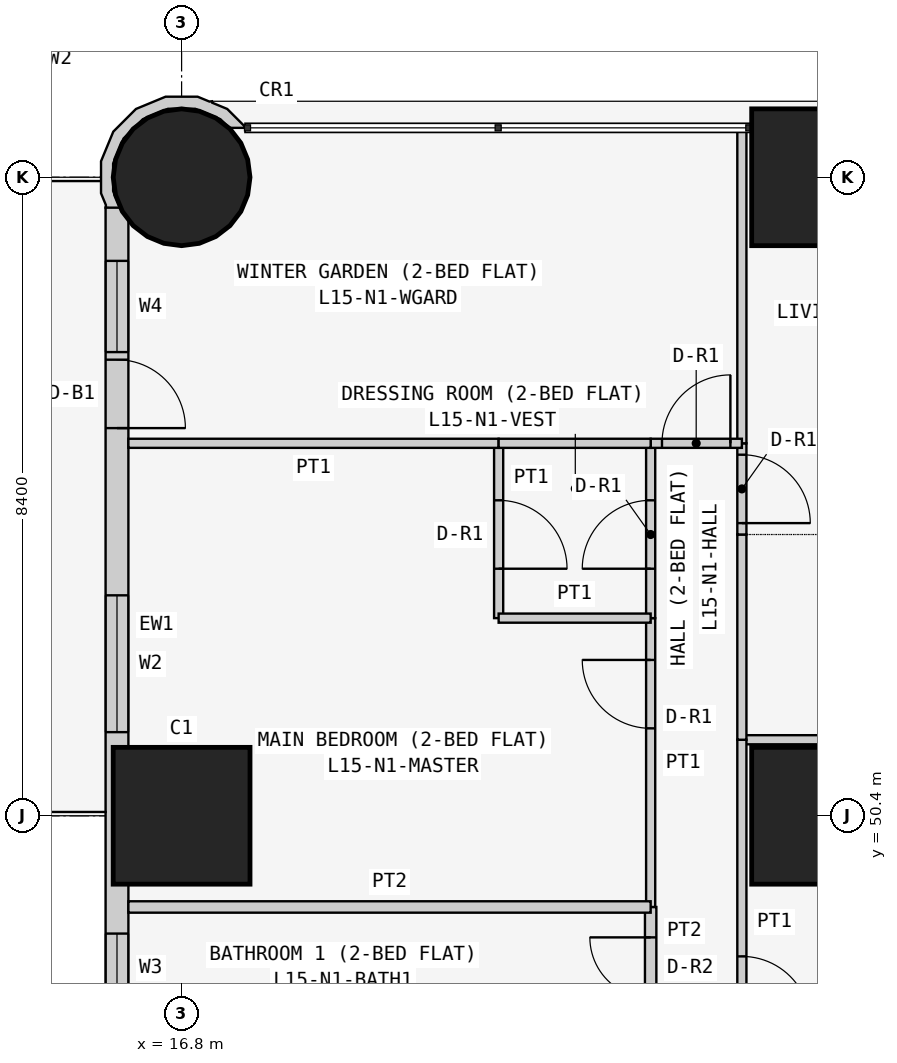
"""IFC4 building model, lengths in metres.
Left out: names, types, materials, properties, quantities, classifications, styles, units other than length and angle.
Written with IfcOpenShell. Run it as: python <this file> out.ifc"""

import sys

from ifc_helpers import new_model, si_unit, direction, frame, frame_2d, origin, origin_2d, place, context, subcontext, project, spatial, polyline, rectangle, circle, outline, extrude, element, fill, save


model = new_model("IFC4")
c1 = context("Model", 3, precision=1e-05, world=origin(), true_north=direction((0.0, 1.0)))
c2 = subcontext(c1, "Body", "Model", "MODEL_VIEW")
j1 = project(units=[si_unit("LENGTHUNIT", "METRE"), si_unit("PLANEANGLEUNIT", "RADIAN")], contexts=[c1])
p1 = place(None, origin())
s1 = spatial("IfcSite", under=j1, at=p1, CompositionType="ELEMENT")
p2 = place(p1, origin())
s2 = spatial("IfcBuilding", under=s1, at=p2, CompositionType="ELEMENT")
p3 = place(p2, frame((0.0, 0.0, 63.3)))
s3 = spatial("IfcBuildingStorey", under=s2, at=p3, CompositionType="ELEMENT", Elevation=63.3)
p4 = place(p3, frame((16.8, 50.4, 0.0), z_axis=(0.0, 0.0, 1.0), x_axis=(1.0, 0.0, 0.0)))
e1 = element("IfcColumn", 1, at=p4, inside=s3, PredefinedType="COLUMN", context=c2, shape_type="SweptSolid", body=[
    extrude(rectangle(XDim=1.8, YDim=1.8, at=origin_2d()), origin(), (0.0, 0.0, 1.0), 3.6),
])
p5 = place(p3, frame((16.8, 58.8, 0.0), z_axis=(0.0, 0.0, 1.0), x_axis=(1.0, 0.0, 0.0)))
e2 = element("IfcColumn", 2, at=p5, inside=s3, PredefinedType="COLUMN", context=c2, shape_type="SweptSolid", body=[
    extrude(circle(Radius=0.9, at=origin_2d()), origin(), (0.0, 0.0, 1.0), 3.6),
])
for number, where, z_axis, x_axis in (
    (3, (25.2, 50.4, 0.0), (0.0, 0.0, 1.0), (1.0, 0.0, 0.0)),
    (4, (25.2, 58.8, 0.0), (0.0, 0.0, 1.0), (1.0, 0.0, 0.0)),
):
    element("IfcColumn", number, at=place(p3, frame(where, z_axis=z_axis, x_axis=x_axis)), inside=s3, PredefinedType="COLUMN", context=c2, shape_type="SweptSolid", body=[
        extrude(rectangle(XDim=1.8, YDim=1.8, at=origin_2d()), origin(), (0.0, 0.0, 1.0), 3.6),
    ])
p6 = place(p3, frame((15.95, 58.4, 0.0), z_axis=(0.0, 0.0, 1.0), x_axis=(0.0, -1.0, 0.0)))
e5 = element("IfcWall", 5, at=p6, inside=s3, PredefinedType="SOLIDWALL", context=c2, shape_type="SweptSolid", body=[
    extrude(rectangle(XDim=15.7, YDim=0.3, at=frame_2d((7.85, 0.0))), origin(), (0.0, 0.0, 1.0), 3.45),
])
p7 = place(p6, frame((12.4, 0.0, 0.9)))
e6 = element("IfcOpeningElement", 6, at=p7, cuts=e5, PredefinedType="OPENING", context=c2, shape_type="SweptSolid", body=[
    extrude(rectangle(XDim=1.8, YDim=1.5, at=frame_2d((0.9, 0.75))), frame((0.0, 0.16, 0.0), z_axis=(0.0, -1.0, 0.0), x_axis=(1.0, 0.0, 0.0)), (0.0, 0.0, 1.0), 0.32),
])
p8 = place(p6, frame((9.55, 0.0, 1.5)))
e7 = element("IfcOpeningElement", 7, at=p8, cuts=e5, PredefinedType="OPENING", context=c2, shape_type="SweptSolid", body=[
    extrude(rectangle(XDim=0.9, YDim=0.7, at=frame_2d((0.45, 0.35))), frame((0.0, 0.16, 0.0), z_axis=(0.0, -1.0, 0.0), x_axis=(1.0, 0.0, 0.0)), (0.0, 0.0, 1.0), 0.32),
])
p9 = place(p6, frame((5.1, 0.0, 0.9)))
e8 = element("IfcOpeningElement", 8, at=p9, cuts=e5, PredefinedType="OPENING", context=c2, shape_type="SweptSolid", body=[
    extrude(rectangle(XDim=1.8, YDim=1.5, at=frame_2d((0.9, 0.75))), frame((0.0, 0.16, 0.0), z_axis=(0.0, -1.0, 0.0), x_axis=(1.0, 0.0, 0.0)), (0.0, 0.0, 1.0), 0.32),
])
p10 = place(p6, frame((2.0, 0.0, 0.0)))
e9 = element("IfcOpeningElement", 9, at=p10, cuts=e5, PredefinedType="OPENING", context=c2, shape_type="SweptSolid", body=[
    extrude(rectangle(XDim=0.9, YDim=2.4, at=frame_2d((0.45, 1.2))), frame((0.0, 0.16, 0.0), z_axis=(0.0, -1.0, 0.0), x_axis=(1.0, 0.0, 0.0)), (0.0, 0.0, 1.0), 0.32),
])
p11 = place(p6, frame((0.7, 0.0, 0.9)))
e10 = element("IfcOpeningElement", 10, at=p11, cuts=e5, PredefinedType="OPENING", context=c2, shape_type="SweptSolid", body=[
    extrude(rectangle(XDim=1.2, YDim=1.5, at=frame_2d((0.6, 0.75))), frame((0.0, 0.16, 0.0), z_axis=(0.0, -1.0, 0.0), x_axis=(1.0, 0.0, 0.0)), (0.0, 0.0, 1.0), 0.32),
])
p12 = place(p3, frame((17.567, 59.411, 0.0), z_axis=(0.0, 0.0, 1.0), x_axis=(-0.377204953059, 0.926129809145, 0.0)))
e11 = element("IfcWall", 11, at=p12, inside=s3, PredefinedType="SOLIDWALL", context=c2, shape_type="SweptSolid", body=[
    extrude(outline(polyline([(-0.27, 2.017), (-0.37, 1.841), (-0.102, 1.842), (0.23, 1.707), (0.484, 1.455), (0.624, 1.125), (0.626, 0.766), (0.491, 0.434), (0.239, 0.18), (0.09, 0.117), (0.011, -0.078), (0.024, -0.083), (0.329, 0.045), (0.48, 0.198), (0.499, 0.193), (0.508, 0.225), (0.626, 0.345), (0.785, 0.736), (0.782, 1.157), (0.619, 1.546), (0.319, 1.842), (-0.072, 2.002), (-0.24, 2.0), (-0.27, 2.017)])), origin(), (0.0, 0.0, 1.0), 3.45),
])
p13 = place(p3, frame((29.4, 51.4, 0.0), z_axis=(0.0, 0.0, 1.0), x_axis=(-1.0, 0.0, 0.0)))
e12 = element("IfcWall", 12, at=p13, inside=s3, PredefinedType="PARTITIONING", context=c2, shape_type="SweptSolid", body=[
    extrude(rectangle(XDim=5.229, YDim=0.12, at=frame_2d((2.615, 0.0))), origin(), (0.0, 0.0, 1.0), 3.45),
])
p14 = place(p3, frame((24.171, 51.4, 0.0), z_axis=(0.0, 0.0, 1.0), x_axis=(0.0, -1.0, 0.0)))
e13 = element("IfcWall", 13, at=p14, inside=s3, PredefinedType="PARTITIONING", context=c2, shape_type="SweptSolid", body=[
    extrude(rectangle(XDim=4.8, YDim=0.12, at=frame_2d((2.4, 0.0))), origin(), (0.0, 0.0, 1.0), 3.45),
])
p15 = place(p14, frame((2.85, 0.0, 0.0)))
e14 = element("IfcOpeningElement", 14, at=p15, cuts=e13, PredefinedType="OPENING", context=c2, shape_type="SweptSolid", body=[
    extrude(rectangle(XDim=0.9, YDim=2.1, at=frame_2d((0.45, 1.05))), frame((0.0, 0.07, 0.0), z_axis=(0.0, -1.0, 0.0), x_axis=(1.0, 0.0, 0.0)), (0.0, 0.0, 1.0), 0.14),
])
p16 = place(p3, frame((24.171, 54.1, 0.0), z_axis=(0.0, 0.0, 1.0), x_axis=(0.0, -1.0, 0.0)))
e15 = element("IfcWall", 15, at=p16, inside=s3, PredefinedType="PARTITIONING", context=c2, shape_type="SweptSolid", body=[
    extrude(rectangle(XDim=2.7, YDim=0.12, at=frame_2d((1.35, 0.0))), origin(), (0.0, 0.0, 1.0), 3.45),
])
p17 = place(p3, frame((24.171, 55.3, 0.0), z_axis=(0.0, 0.0, 1.0), x_axis=(0.0, -1.0, 0.0)))
e16 = element("IfcWall", 16, at=p17, inside=s3, PredefinedType="PARTITIONING", context=c2, shape_type="SweptSolid", body=[
    extrude(rectangle(XDim=1.2, YDim=0.12, at=frame_2d((0.6, 0.0))), origin(), (0.0, 0.0, 1.0), 3.45),
])
p18 = place(p17, frame((0.15, 0.0, 0.0)))
e17 = element("IfcOpeningElement", 17, at=p18, cuts=e16, PredefinedType="OPENING", context=c2, shape_type="SweptSolid", body=[
    extrude(rectangle(XDim=0.9, YDim=2.1, at=frame_2d((0.45, 1.05))), frame((0.0, 0.07, 0.0), z_axis=(0.0, -1.0, 0.0), x_axis=(1.0, 0.0, 0.0)), (0.0, 0.0, 1.0), 0.14),
])
p19 = place(p3, frame((24.171, 59.45, 0.0), z_axis=(0.0, 0.0, 1.0), x_axis=(0.0, -1.0, 0.0)))
e18 = element("IfcWall", 18, at=p19, inside=s3, PredefinedType="PARTITIONING", context=c2, shape_type="SweptSolid", body=[
    extrude(rectangle(XDim=4.15, YDim=0.12, at=frame_2d((2.075, 0.0))), origin(), (0.0, 0.0, 1.0), 3.45),
])
p20 = place(p3, frame((22.971, 49.2, 0.0), z_axis=(0.0, 0.0, 1.0), x_axis=(0.0, -1.0, 0.0)))
e19 = element("IfcWall", 19, at=p20, inside=s3, PredefinedType="PARTITIONING", context=c2, shape_type="SweptSolid", body=[
    extrude(rectangle(XDim=1.6, YDim=0.15, at=frame_2d((0.8, 0.0))), origin(), (0.0, 0.0, 1.0), 3.45),
])
p21 = place(p20, frame((0.4, 0.0, 0.0)))
e20 = element("IfcOpeningElement", 20, at=p21, cuts=e19, PredefinedType="OPENING", context=c2, shape_type="SweptSolid", body=[
    extrude(rectangle(XDim=0.8, YDim=2.1, at=frame_2d((0.4, 1.05))), frame((0.0, 0.085, 0.0), z_axis=(0.0, -1.0, 0.0), x_axis=(1.0, 0.0, 0.0)), (0.0, 0.0, 1.0), 0.17),
])
p22 = place(p3, frame((22.971, 53.0, 0.0), z_axis=(0.0, 0.0, 1.0), x_axis=(0.0, -1.0, 0.0)))
e21 = element("IfcWall", 21, at=p22, inside=s3, PredefinedType="PARTITIONING", context=c2, shape_type="SweptSolid", body=[
    extrude(rectangle(XDim=3.8, YDim=0.12, at=frame_2d((1.9, 0.0))), origin(), (0.0, 0.0, 1.0), 3.45),
])
p23 = place(p22, frame((0.55, 0.0, 0.0)))
e22 = element("IfcOpeningElement", 22, at=p23, cuts=e21, PredefinedType="OPENING", context=c2, shape_type="SweptSolid", body=[
    extrude(rectangle(XDim=0.9, YDim=2.1, at=frame_2d((0.45, 1.05))), frame((0.0, 0.07, 0.0), z_axis=(0.0, -1.0, 0.0), x_axis=(1.0, 0.0, 0.0)), (0.0, 0.0, 1.0), 0.14),
])
p24 = place(p3, frame((22.971, 55.3, 0.0), z_axis=(0.0, 0.0, 1.0), x_axis=(0.0, -1.0, 0.0)))
e23 = element("IfcWall", 23, at=p24, inside=s3, PredefinedType="PARTITIONING", context=c2, shape_type="SweptSolid", body=[
    extrude(rectangle(XDim=2.3, YDim=0.12, at=frame_2d((1.15, 0.0))), origin(), (0.0, 0.0, 1.0), 3.45),
])
p25 = place(p24, frame((0.75, 0.0, 0.0)))
e24 = element("IfcOpeningElement", 24, at=p25, cuts=e23, PredefinedType="OPENING", context=c2, shape_type="SweptSolid", body=[
    extrude(rectangle(XDim=0.9, YDim=2.1, at=frame_2d((0.45, 1.05))), frame((0.0, 0.07, 0.0), z_axis=(0.0, -1.0, 0.0), x_axis=(1.0, 0.0, 0.0)), (0.0, 0.0, 1.0), 0.14),
])
p26 = place(p3, frame((24.171, 55.3, 0.0), z_axis=(0.0, 0.0, 1.0), x_axis=(-1.0, 0.0, 0.0)))
e25 = element("IfcWall", 25, at=p26, inside=s3, PredefinedType="PARTITIONING", context=c2, shape_type="SweptSolid", body=[
    extrude(rectangle(XDim=1.2, YDim=0.12, at=frame_2d((0.6, 0.0))), origin(), (0.0, 0.0, 1.0), 3.45),
])
p27 = place(p26, frame((0.151, 0.0, 0.0)))
e26 = element("IfcOpeningElement", 26, at=p27, cuts=e25, PredefinedType="OPENING", context=c2, shape_type="SweptSolid", body=[
    extrude(rectangle(XDim=0.9, YDim=2.1, at=frame_2d((0.45, 1.05))), frame((0.0, 0.07, 0.0), z_axis=(0.0, -1.0, 0.0), x_axis=(1.0, 0.0, 0.0)), (0.0, 0.0, 1.0), 0.14),
])
p28 = place(p3, frame((22.971, 49.2, 0.0), z_axis=(0.0, 0.0, 1.0), x_axis=(-1.0, 0.0, 0.0)))
e27 = element("IfcWall", 27, at=p28, inside=s3, PredefinedType="PARTITIONING", context=c2, shape_type="SweptSolid", body=[
    extrude(rectangle(XDim=6.871, YDim=0.15, at=frame_2d((3.436, 0.0))), origin(), (0.0, 0.0, 1.0), 3.45),
])
p29 = place(p3, frame((20.971, 55.3, 0.0), z_axis=(0.0, 0.0, 1.0), x_axis=(0.0, -1.0, 0.0)))
e28 = element("IfcWall", 28, at=p29, inside=s3, PredefinedType="PARTITIONING", context=c2, shape_type="SweptSolid", body=[
    extrude(rectangle(XDim=2.3, YDim=0.12, at=frame_2d((1.15, 0.0))), origin(), (0.0, 0.0, 1.0), 2.848),
])
p30 = place(p29, frame((0.75, 0.0, 0.0)))
e29 = element("IfcOpeningElement", 29, at=p30, cuts=e28, PredefinedType="OPENING", context=c2, shape_type="SweptSolid", body=[
    extrude(rectangle(XDim=0.9, YDim=2.1, at=frame_2d((0.45, 1.05))), frame((0.0, 0.07, 0.0), z_axis=(0.0, -1.0, 0.0), x_axis=(1.0, 0.0, 0.0)), (0.0, 0.0, 1.0), 0.14),
])
p31 = place(p3, frame((20.971, 53.0, 0.0), z_axis=(0.0, 0.0, 1.0), x_axis=(1.0, 0.0, 0.0)))
e30 = element("IfcWall", 30, at=p31, inside=s3, PredefinedType="PARTITIONING", context=c2, shape_type="SweptSolid", body=[
    extrude(rectangle(XDim=2.0, YDim=0.12, at=frame_2d((1.0, 0.0))), origin(), (0.0, 0.0, 1.0), 3.45),
])
p32 = place(p3, frame((16.1, 55.3, 0.0), z_axis=(0.0, 0.0, 1.0), x_axis=(1.0, 0.0, 0.0)))
e31 = element("IfcWall", 31, at=p32, inside=s3, PredefinedType="PARTITIONING", context=c2, shape_type="SweptSolid", body=[
    extrude(rectangle(XDim=4.871, YDim=0.12, at=frame_2d((2.436, 0.0))), origin(), (0.0, 0.0, 1.0), 3.45),
])
p33 = place(p3, frame((22.971, 55.3, 0.0), z_axis=(0.0, 0.0, 1.0), x_axis=(-1.0, 0.0, 0.0)))
e32 = element("IfcWall", 32, at=p33, inside=s3, PredefinedType="PARTITIONING", context=c2, shape_type="SweptSolid", body=[
    extrude(rectangle(XDim=2.0, YDim=0.12, at=frame_2d((1.0, 0.0))), origin(), (0.0, 0.0, 1.0), 3.45),
])
p34 = place(p8, origin())
e33 = element("IfcWindow", 33, at=p34, inside=s3, PartitioningType="SINGLE_PANEL", PredefinedType="WINDOW", context=c2, shape_type="SweptSolid", body=[
    extrude(rectangle(XDim=0.9, YDim=0.7, at=frame_2d((0.45, 0.35))), frame((0.0, 0.03, 0.0), z_axis=(0.0, -1.0, 0.0), x_axis=(1.0, 0.0, 0.0)), (0.0, 0.0, 1.0), 0.06),
])
fill(e7, e33)
p35 = place(p9, origin())
e34 = element("IfcWindow", 34, at=p35, inside=s3, PartitioningType="SINGLE_PANEL", PredefinedType="WINDOW", context=c2, shape_type="SweptSolid", body=[
    extrude(rectangle(XDim=1.8, YDim=1.5, at=frame_2d((0.9, 0.75))), frame((0.0, 0.03, 0.0), z_axis=(0.0, -1.0, 0.0), x_axis=(1.0, 0.0, 0.0)), (0.0, 0.0, 1.0), 0.06),
])
fill(e8, e34)
p36 = place(p10, origin())
e35 = element("IfcDoor", 35, at=p36, inside=s3, OperationType="SINGLE_SWING_RIGHT", PredefinedType="DOOR", context=c2, shape_type="SweptSolid", body=[
    extrude(rectangle(XDim=0.9, YDim=2.4, at=frame_2d((0.45, 1.2))), frame((0.0, 0.025, 0.0), z_axis=(0.0, -1.0, 0.0), x_axis=(1.0, 0.0, 0.0)), (0.0, 0.0, 1.0), 0.05),
])
fill(e9, e35)
p37 = place(p11, origin())
e36 = element("IfcWindow", 36, at=p37, inside=s3, PartitioningType="SINGLE_PANEL", PredefinedType="WINDOW", context=c2, shape_type="SweptSolid", body=[
    extrude(rectangle(XDim=1.2, YDim=1.5, at=frame_2d((0.6, 0.75))), frame((0.0, 0.03, 0.0), z_axis=(0.0, -1.0, 0.0), x_axis=(1.0, 0.0, 0.0)), (0.0, 0.0, 1.0), 0.06),
])
fill(e10, e36)
p38 = place(p15, origin())
e37 = element("IfcDoor", 37, at=p38, inside=s3, OperationType="SINGLE_SWING_RIGHT", PredefinedType="DOOR", context=c2, shape_type="SweptSolid", body=[
    extrude(rectangle(XDim=0.9, YDim=2.1, at=frame_2d((0.45, 1.05))), frame((0.0, 0.025, 0.0), z_axis=(0.0, -1.0, 0.0), x_axis=(1.0, 0.0, 0.0)), (0.0, 0.0, 1.0), 0.05),
])
fill(e14, e37)
p39 = place(p18, origin())
e38 = element("IfcDoor", 38, at=p39, inside=s3, OperationType="SINGLE_SWING_RIGHT", PredefinedType="DOOR", context=c2, shape_type="SweptSolid", body=[
    extrude(rectangle(XDim=0.9, YDim=2.1, at=frame_2d((0.45, 1.05))), frame((0.0, 0.025, 0.0), z_axis=(0.0, -1.0, 0.0), x_axis=(1.0, 0.0, 0.0)), (0.0, 0.0, 1.0), 0.05),
])
fill(e17, e38)
p40 = place(p21, frame((0.8, 0.0, 0.0), z_axis=(0.0, 0.0, 1.0), x_axis=(-1.0, 0.0, 0.0)))
e39 = element("IfcDoor", 39, at=p40, inside=s3, OperationType="SINGLE_SWING_RIGHT", PredefinedType="DOOR", context=c2, shape_type="SweptSolid", body=[
    extrude(rectangle(XDim=0.8, YDim=2.1, at=frame_2d((0.4, 1.05))), frame((0.0, 0.025, 0.0), z_axis=(0.0, -1.0, 0.0), x_axis=(1.0, 0.0, 0.0)), (0.0, 0.0, 1.0), 0.05),
])
fill(e20, e39)
p41 = place(p23, frame((0.9, 0.0, 0.0), z_axis=(0.0, 0.0, 1.0), x_axis=(-1.0, 0.0, 0.0)))
e40 = element("IfcDoor", 40, at=p41, inside=s3, OperationType="SINGLE_SWING_RIGHT", PredefinedType="DOOR", context=c2, shape_type="SweptSolid", body=[
    extrude(rectangle(XDim=0.9, YDim=2.1, at=frame_2d((0.45, 1.05))), frame((0.0, 0.025, 0.0), z_axis=(0.0, -1.0, 0.0), x_axis=(1.0, 0.0, 0.0)), (0.0, 0.0, 1.0), 0.05),
])
fill(e22, e40)
p42 = place(p25, frame((0.9, 0.0, 0.0), z_axis=(0.0, 0.0, 1.0), x_axis=(-1.0, 0.0, 0.0)))
e41 = element("IfcDoor", 41, at=p42, inside=s3, OperationType="SINGLE_SWING_LEFT", PredefinedType="DOOR", context=c2, shape_type="SweptSolid", body=[
    extrude(rectangle(XDim=0.9, YDim=2.1, at=frame_2d((0.45, 1.05))), frame((0.0, 0.025, 0.0), z_axis=(0.0, -1.0, 0.0), x_axis=(1.0, 0.0, 0.0)), (0.0, 0.0, 1.0), 0.05),
])
fill(e24, e41)
p43 = place(p30, origin())
e42 = element("IfcDoor", 42, at=p43, inside=s3, OperationType="SINGLE_SWING_RIGHT", PredefinedType="DOOR", context=c2, shape_type="SweptSolid", body=[
    extrude(rectangle(XDim=0.9, YDim=2.1, at=frame_2d((0.45, 1.05))), frame((0.0, 0.025, 0.0), z_axis=(0.0, -1.0, 0.0), x_axis=(1.0, 0.0, 0.0)), (0.0, 0.0, 1.0), 0.05),
])
fill(e29, e42)
p44 = place(p27, frame((0.9, 0.0, 0.0), z_axis=(0.0, 0.0, 1.0), x_axis=(-1.0, 0.0, 0.0)))
e43 = element("IfcDoor", 43, at=p44, inside=s3, OperationType="SINGLE_SWING_RIGHT", PredefinedType="DOOR", context=c2, shape_type="SweptSolid", body=[
    extrude(rectangle(XDim=0.9, YDim=2.1, at=frame_2d((0.45, 1.05))), frame((0.0, 0.025, 0.0), z_axis=(0.0, -1.0, 0.0), x_axis=(1.0, 0.0, 0.0)), (0.0, 0.0, 1.0), 0.05),
])
fill(e26, e43)
save(model, sys.argv[1])
